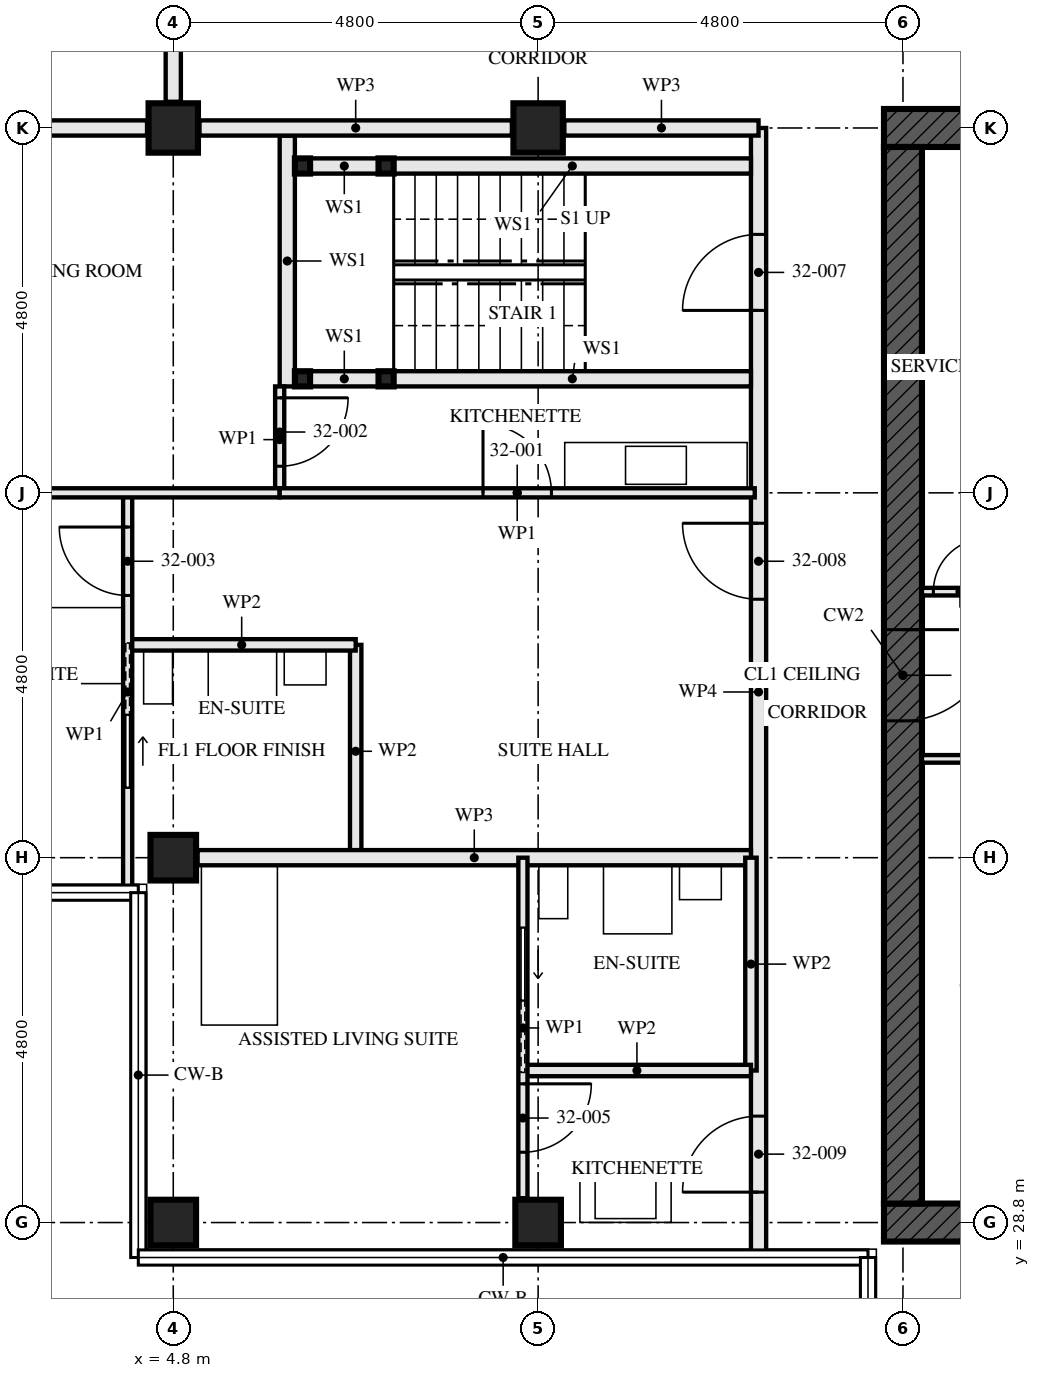
"""IFC4 building model, lengths in metres.
Left out: names, types, materials, properties, quantities, classifications, styles, units other than length and angle.
Written with IfcOpenShell. Run it as: python <this file> out.ifc"""

import sys

from ifc_helpers import new_model, si_unit, direction, frame, frame_2d, origin, origin_2d, place, context, subcontext, project, spatial, rectangle, hollow_rectangle, extrude, element, fill, save


model = new_model("IFC4")
c1 = context("Model", 3, precision=1e-05, world=origin(), true_north=direction((0.0, 1.0)))
c2 = subcontext(c1, "Body", "Model", "MODEL_VIEW")
j1 = project(units=[si_unit("LENGTHUNIT", "METRE"), si_unit("PLANEANGLEUNIT", "RADIAN")], contexts=[c1])
p1 = place(None, origin())
s1 = spatial("IfcSite", under=j1, at=p1, CompositionType="ELEMENT")
p2 = place(p1, origin())
s2 = spatial("IfcBuilding", under=s1, at=p2, CompositionType="ELEMENT")
p3 = place(p2, frame((0.0, 0.0, 119.0)))
s3 = spatial("IfcBuildingStorey", under=s2, at=p3, CompositionType="ELEMENT", Elevation=119.0)
for number, where, z_axis, x_axis in (
    (1, (4.8, 28.8, 0.0), (0.0, 0.0, 1.0), (0.0, 1.0, 0.0)),
    (2, (4.8, 33.6, 0.0), (0.0, 0.0, 1.0), (0.0, 1.0, 0.0)),
):
    element("IfcColumn", number, at=place(p3, frame(where, z_axis=z_axis, x_axis=x_axis)), inside=s3, PredefinedType="COLUMN", context=c2, shape_type="SweptSolid", body=[
        extrude(hollow_rectangle(XDim=0.6, YDim=0.6, WallThickness=0.08, at=origin_2d()), origin(), (0.0, 0.0, 1.0), 3.5),
    ])
p4 = place(p3, frame((4.8, 43.2, 0.0), z_axis=(0.0, 0.0, 1.0), x_axis=(0.0, 1.0, 0.0)))
e3 = element("IfcColumn", 3, at=p4, inside=s3, PredefinedType="COLUMN", context=c2, shape_type="SweptSolid", body=[
    extrude(hollow_rectangle(XDim=0.65, YDim=0.65, WallThickness=0.05, at=origin_2d()), origin(), (0.0, 0.0, 1.0), 3.5),
])
p5 = place(p3, frame((9.6, 28.8, 0.0), z_axis=(0.0, 0.0, 1.0), x_axis=(0.0, 1.0, 0.0)))
e4 = element("IfcColumn", 4, at=p5, inside=s3, PredefinedType="COLUMN", context=c2, shape_type="SweptSolid", body=[
    extrude(hollow_rectangle(XDim=0.6, YDim=0.6, WallThickness=0.08, at=origin_2d()), origin(), (0.0, 0.0, 1.0), 3.5),
])
p6 = place(p3, frame((9.6, 43.2, 0.0), z_axis=(0.0, 0.0, 1.0), x_axis=(0.0, 1.0, 0.0)))
e5 = element("IfcColumn", 5, at=p6, inside=s3, PredefinedType="COLUMN", context=c2, shape_type="SweptSolid", body=[
    extrude(hollow_rectangle(XDim=0.65, YDim=0.65, WallThickness=0.05, at=origin_2d()), origin(), (0.0, 0.0, 1.0), 3.5),
])
p7 = place(p3, frame((14.15, 28.8, -0.17), z_axis=(0.0, 0.0, 1.0), x_axis=(1.0, 0.0, 0.0)))
e6 = element("IfcWall", 6, at=p7, inside=s3, PredefinedType="SHEAR", context=c2, shape_type="SweptSolid", body=[
    extrude(rectangle(XDim=14.9, YDim=0.5, at=frame_2d((7.45, 0.0))), origin(), (0.0, 0.0, 1.0), 3.5),
])
p8 = place(p7, frame((6.85, 0.0, 0.17)))
e7 = element("IfcOpeningElement", 7, at=p8, cuts=e6, PredefinedType="OPENING", context=c2, shape_type="SweptSolid", body=[
    extrude(rectangle(XDim=1.2, YDim=2.1, at=frame_2d((0.6, 1.05))), frame((0.0, 0.26, 0.0), z_axis=(0.0, -1.0, 0.0), x_axis=(1.0, 0.0, 0.0)), (0.0, 0.0, 1.0), 0.521),
])
p9 = place(p3, frame((29.05, 43.2, -0.17), z_axis=(0.0, 0.0, 1.0), x_axis=(-1.0, 0.0, 0.0)))
e8 = element("IfcWall", 8, at=p9, inside=s3, PredefinedType="SHEAR", context=c2, shape_type="SweptSolid", body=[
    extrude(rectangle(XDim=14.9, YDim=0.5, at=frame_2d((7.45, 0.0))), origin(), (0.0, 0.0, 1.0), 3.5),
])
p10 = place(p9, frame((6.85, 0.0, 0.17)))
e9 = element("IfcOpeningElement", 9, at=p10, cuts=e8, PredefinedType="OPENING", context=c2, shape_type="SweptSolid", body=[
    extrude(rectangle(XDim=1.2, YDim=2.1, at=frame_2d((0.6, 1.05))), frame((0.0, 0.26, 0.0), z_axis=(0.0, -1.0, 0.0), x_axis=(1.0, 0.0, 0.0)), (0.0, 0.0, 1.0), 0.521),
])
p11 = place(p3, frame((14.4, 42.95, -0.17), z_axis=(0.0, 0.0, 1.0), x_axis=(0.0, -1.0, 0.0)))
e10 = element("IfcWall", 10, at=p11, inside=s3, PredefinedType="SHEAR", context=c2, shape_type="SweptSolid", body=[
    extrude(rectangle(XDim=13.9, YDim=0.5, at=frame_2d((6.95, 0.0))), origin(), (0.0, 0.0, 1.0), 3.5),
])
p12 = place(p11, frame((6.35, 0.0, 0.17)))
e11 = element("IfcOpeningElement", 11, at=p12, cuts=e10, PredefinedType="OPENING", context=c2, shape_type="SweptSolid", body=[
    extrude(rectangle(XDim=1.2, YDim=2.1, at=frame_2d((0.6, 1.05))), frame((0.0, 0.26, 0.0), z_axis=(0.0, -1.0, 0.0), x_axis=(1.0, 0.0, 0.0)), (0.0, 0.0, 1.0), 0.521),
])
for number, where, z_axis, x_axis in (
    (12, (6.5, 42.7, 0.0), (0.0, 0.0, 1.0), (1.0, 0.0, 0.0)),
    (13, (6.5, 39.9, 0.0), (0.0, 0.0, 1.0), (1.0, 0.0, 0.0)),
    (14, (7.6, 42.7, 0.0), (0.0, 0.0, 1.0), (1.0, 0.0, 0.0)),
    (15, (7.6, 39.9, 0.0), (0.0, 0.0, 1.0), (1.0, 0.0, 0.0)),
):
    element("IfcColumn", number, at=place(p3, frame(where, z_axis=z_axis, x_axis=x_axis)), inside=s3, PredefinedType="COLUMN", context=c2, shape_type="SweptSolid", body=[
        extrude(hollow_rectangle(XDim=0.2, YDim=0.2, WallThickness=0.008, at=origin_2d()), origin(), (0.0, 0.0, 1.0), 3.33),
    ])
p13 = place(p3, frame((6.6, 42.7, 0.0), z_axis=(0.0, 0.0, 1.0), x_axis=(1.0, 0.0, 0.0)))
e16 = element("IfcWall", 16, at=p13, inside=s3, PredefinedType="SOLIDWALL", context=c2, shape_type="SweptSolid", body=[
    extrude(rectangle(XDim=0.9, YDim=0.2, at=frame_2d((0.45, 0.0))), origin(), (0.0, 0.0, 1.0), 2.99),
])
p14 = place(p3, frame((7.7, 42.7, 0.0), z_axis=(0.0, 0.0, 1.0), x_axis=(1.0, 0.0, 0.0)))
e17 = element("IfcWall", 17, at=p14, inside=s3, PredefinedType="SOLIDWALL", context=c2, shape_type="SweptSolid", body=[
    extrude(rectangle(XDim=4.7, YDim=0.2, at=frame_2d((2.35, 0.0))), origin(), (0.0, 0.0, 1.0), 2.99),
])
p15 = place(p3, frame((6.6, 39.9, 0.0), z_axis=(0.0, 0.0, 1.0), x_axis=(1.0, 0.0, 0.0)))
e18 = element("IfcWall", 18, at=p15, inside=s3, PredefinedType="SOLIDWALL", context=c2, shape_type="SweptSolid", body=[
    extrude(rectangle(XDim=0.9, YDim=0.2, at=frame_2d((0.45, 0.0))), origin(), (0.0, 0.0, 1.0), 2.99),
])
p16 = place(p3, frame((7.7, 39.9, 0.0), z_axis=(0.0, 0.0, 1.0), x_axis=(1.0, 0.0, 0.0)))
e19 = element("IfcWall", 19, at=p16, inside=s3, PredefinedType="SOLIDWALL", context=c2, shape_type="SweptSolid", body=[
    extrude(rectangle(XDim=4.7, YDim=0.2, at=frame_2d((2.35, 0.0))), origin(), (0.0, 0.0, 1.0), 2.99),
])
p17 = place(p3, frame((6.3, 43.1, 0.0), z_axis=(0.0, 0.0, 1.0), x_axis=(0.0, -1.0, 0.0)))
e20 = element("IfcWall", 20, at=p17, inside=s3, PredefinedType="SOLIDWALL", context=c2, shape_type="SweptSolid", body=[
    extrude(rectangle(XDim=3.3, YDim=0.2, at=frame_2d((1.65, 0.0))), origin(), (0.0, 0.0, 1.0), 3.33),
])
p18 = place(p3, frame((4.2, 36.4, 0.0), z_axis=(0.0, 0.0, 1.0), x_axis=(1.0, 0.0, 0.0)))
e21 = element("IfcWall", 21, at=p18, inside=s3, PredefinedType="PARTITIONING", context=c2, shape_type="SweptSolid", body=[
    extrude(rectangle(XDim=3.0, YDim=0.15, at=frame_2d((1.5, 0.0))), origin(), (0.0, 0.0, 1.0), 3.33),
])
p19 = place(p3, frame((7.2, 36.4, 0.0), z_axis=(0.0, 0.0, 1.0), x_axis=(0.0, -1.0, 0.0)))
e22 = element("IfcWall", 22, at=p19, inside=s3, PredefinedType="PARTITIONING", context=c2, shape_type="SweptSolid", body=[
    extrude(rectangle(XDim=2.8, YDim=0.15, at=frame_2d((1.4, 0.0))), origin(), (0.0, 0.0, 1.0), 3.33),
])
p20 = place(p3, frame((6.2, 38.4, 0.0), z_axis=(0.0, 0.0, 1.0), x_axis=(1.0, 0.0, 0.0)))
e23 = element("IfcWall", 23, at=p20, inside=s3, PredefinedType="PARTITIONING", context=c2, shape_type="SweptSolid", body=[
    extrude(rectangle(XDim=6.25, YDim=0.12, at=frame_2d((3.125, 0.0))), origin(), (0.0, 0.0, 1.0), 2.55),
])
p21 = place(p20, frame((2.675, 0.0, 0.0)))
e24 = element("IfcOpeningElement", 24, at=p21, cuts=e23, PredefinedType="OPENING", context=c2, shape_type="SweptSolid", body=[
    extrude(rectangle(XDim=0.9, YDim=2.1, at=frame_2d((0.45, 1.05))), frame((0.0, 0.071, 0.0), z_axis=(0.0, -1.0, 0.0), x_axis=(1.0, 0.0, 0.0)), (0.0, 0.0, 1.0), 0.141),
])
p22 = place(p3, frame((6.2, 39.8, 0.0), z_axis=(0.0, 0.0, 1.0), x_axis=(0.0, -1.0, 0.0)))
e25 = element("IfcWall", 25, at=p22, inside=s3, PredefinedType="PARTITIONING", context=c2, shape_type="SweptSolid", body=[
    extrude(rectangle(XDim=1.4, YDim=0.12, at=frame_2d((0.7, 0.0))), origin(), (0.0, 0.0, 1.0), 3.33),
])
p23 = place(p22, frame((0.15, 0.0, 0.0)))
e26 = element("IfcOpeningElement", 26, at=p23, cuts=e25, PredefinedType="OPENING", context=c2, shape_type="SweptSolid", body=[
    extrude(rectangle(XDim=0.9, YDim=2.1, at=frame_2d((0.45, 1.05))), frame((0.0, 0.071, 0.0), z_axis=(0.0, -1.0, 0.0), x_axis=(1.0, 0.0, 0.0)), (0.0, 0.0, 1.0), 0.141),
])
p24 = place(p3, frame((4.2, 38.4, 0.0), z_axis=(0.0, 0.0, 1.0), x_axis=(0.0, -1.0, 0.0)))
e27 = element("IfcWall", 27, at=p24, inside=s3, PredefinedType="PARTITIONING", context=c2, shape_type="SweptSolid", body=[
    extrude(rectangle(XDim=5.24, YDim=0.12, at=frame_2d((2.62, 0.0))), origin(), (0.0, 0.0, 1.0), 2.32),
])
p25 = place(p24, frame((0.45, 0.0, 0.0)))
e28 = element("IfcOpeningElement", 28, at=p25, cuts=e27, PredefinedType="OPENING", context=c2, shape_type="SweptSolid", body=[
    extrude(rectangle(XDim=0.9, YDim=2.1, at=frame_2d((0.45, 1.05))), frame((0.0, 0.071, 0.0), z_axis=(0.0, -1.0, 0.0), x_axis=(1.0, 0.0, 0.0)), (0.0, 0.0, 1.0), 0.141),
])
p26 = place(p24, frame((2.925, 0.0, 0.0)))
e29 = element("IfcOpeningElement", 29, at=p26, cuts=e27, PredefinedType="OPENING", context=c2, shape_type="SweptSolid", body=[
    extrude(rectangle(XDim=0.95, YDim=2.1, at=frame_2d((0.475, 1.05))), frame((0.0, 0.071, 0.0), z_axis=(0.0, -1.0, 0.0), x_axis=(1.0, 0.0, 0.0)), (0.0, 0.0, 1.0), 0.141),
])
p27 = place(p3, frame((0.32, 38.4, 0.0), z_axis=(0.0, 0.0, 1.0), x_axis=(1.0, 0.0, 0.0)))
e30 = element("IfcWall", 30, at=p27, inside=s3, PredefinedType="PARTITIONING", context=c2, shape_type="SweptSolid", body=[
    extrude(rectangle(XDim=5.88, YDim=0.12, at=frame_2d((2.94, 0.0))), origin(), (0.0, 0.0, 1.0), 2.55),
])
p28 = place(p3, frame((5.12, 33.6, 0.0), z_axis=(0.0, 0.0, 1.0), x_axis=(1.0, 0.0, 0.0)))
e31 = element("IfcWall", 31, at=p28, inside=s3, PredefinedType="PARTITIONING", context=c2, shape_type="SweptSolid", body=[
    extrude(rectangle(XDim=7.28, YDim=0.2, at=frame_2d((3.64, 0.0))), origin(), (0.0, 0.0, 1.0), 2.55),
])
p29 = place(p3, frame((9.4, 30.8, 0.0), z_axis=(0.0, 0.0, 1.0), x_axis=(1.0, 0.0, 0.0)))
e32 = element("IfcWall", 32, at=p29, inside=s3, PredefinedType="PARTITIONING", context=c2, shape_type="SweptSolid", body=[
    extrude(rectangle(XDim=3.0, YDim=0.15, at=frame_2d((1.5, 0.0))), origin(), (0.0, 0.0, 1.0), 3.33),
])
p30 = place(p3, frame((12.4, 33.6, 0.0), z_axis=(0.0, 0.0, 1.0), x_axis=(0.0, -1.0, 0.0)))
e33 = element("IfcWall", 33, at=p30, inside=s3, PredefinedType="PARTITIONING", context=c2, shape_type="SweptSolid", body=[
    extrude(rectangle(XDim=2.8, YDim=0.15, at=frame_2d((1.4, 0.0))), origin(), (0.0, 0.0, 1.0), 3.33),
])
p31 = place(p3, frame((9.4, 33.6, 0.0), z_axis=(0.0, 0.0, 1.0), x_axis=(0.0, -1.0, 0.0)))
e34 = element("IfcWall", 34, at=p31, inside=s3, PredefinedType="PARTITIONING", context=c2, shape_type="SweptSolid", body=[
    extrude(rectangle(XDim=4.48, YDim=0.12, at=frame_2d((2.24, 0.0))), origin(), (0.0, 0.0, 1.0), 3.33),
])
p32 = place(p31, frame((2.975, 0.0, 0.0)))
e35 = element("IfcOpeningElement", 35, at=p32, cuts=e34, PredefinedType="OPENING", context=c2, shape_type="SweptSolid", body=[
    extrude(rectangle(XDim=0.9, YDim=2.1, at=frame_2d((0.45, 1.05))), frame((0.0, 0.071, 0.0), z_axis=(0.0, -1.0, 0.0), x_axis=(1.0, 0.0, 0.0)), (0.0, 0.0, 1.0), 0.141),
])
p33 = place(p31, frame((0.925, 0.0, 0.0)))
e36 = element("IfcOpeningElement", 36, at=p33, cuts=e34, PredefinedType="OPENING", context=c2, shape_type="SweptSolid", body=[
    extrude(rectangle(XDim=0.95, YDim=2.1, at=frame_2d((0.475, 1.05))), frame((0.0, 0.071, 0.0), z_axis=(0.0, -1.0, 0.0), x_axis=(1.0, 0.0, 0.0)), (0.0, 0.0, 1.0), 0.141),
])
p34 = place(p3, frame((12.5, 43.2, 0.0), z_axis=(0.0, 0.0, 1.0), x_axis=(0.0, -1.0, 0.0)))
e37 = element("IfcWall", 37, at=p34, inside=s3, PredefinedType="PARTITIONING", context=c2, shape_type="SweptSolid", body=[
    extrude(rectangle(XDim=14.84, YDim=0.2, at=frame_2d((7.42, 0.0))), origin(), (0.0, 0.0, 1.0), 2.32),
])
p35 = place(p34, frame((1.4, 0.0, 0.0)))
e38 = element("IfcOpeningElement", 38, at=p35, cuts=e37, PredefinedType="OPENING", context=c2, shape_type="SweptSolid", body=[
    extrude(rectangle(XDim=1.0, YDim=2.1, at=frame_2d((0.5, 1.05))), frame((0.0, 0.111, 0.0), z_axis=(0.0, -1.0, 0.0), x_axis=(1.0, 0.0, 0.0)), (0.0, 0.0, 1.0), 0.221),
])
p36 = place(p34, frame((5.2, 0.0, 0.0)))
e39 = element("IfcOpeningElement", 39, at=p36, cuts=e37, PredefinedType="OPENING", context=c2, shape_type="SweptSolid", body=[
    extrude(rectangle(XDim=1.0, YDim=2.1, at=frame_2d((0.5, 1.05))), frame((0.0, 0.111, 0.0), z_axis=(0.0, -1.0, 0.0), x_axis=(1.0, 0.0, 0.0)), (0.0, 0.0, 1.0), 0.221),
])
p37 = place(p34, frame((13.0, 0.0, 0.0)))
e40 = element("IfcOpeningElement", 40, at=p37, cuts=e37, PredefinedType="OPENING", context=c2, shape_type="SweptSolid", body=[
    extrude(rectangle(XDim=1.0, YDim=2.1, at=frame_2d((0.5, 1.05))), frame((0.0, 0.111, 0.0), z_axis=(0.0, -1.0, 0.0), x_axis=(1.0, 0.0, 0.0)), (0.0, 0.0, 1.0), 0.221),
])
p38 = place(p3, frame((4.8, 45.2, 0.0), z_axis=(0.0, 0.0, 1.0), x_axis=(0.0, -1.0, 0.0)))
e41 = element("IfcWall", 41, at=p38, inside=s3, PredefinedType="PARTITIONING", context=c2, shape_type="SweptSolid", body=[
    extrude(rectangle(XDim=1.655, YDim=0.2, at=frame_2d((0.828, 0.0))), origin(), (0.0, 0.0, 1.0), 3.33),
])
p39 = place(p3, frame((14.65, 34.9, 0.0), z_axis=(0.0, 0.0, 1.0), x_axis=(1.0, 0.0, 0.0)))
e42 = element("IfcWall", 42, at=p39, inside=s3, PredefinedType="SOLIDWALL", context=c2, shape_type="SweptSolid", body=[
    extrude(rectangle(XDim=5.9, YDim=0.1, at=frame_2d((2.95, 0.0))), origin(), (0.0, 0.0, 1.0), 3.33),
])
p40 = place(p39, frame((1.6, 0.0, 0.0)))
e43 = element("IfcOpeningElement", 43, at=p40, cuts=e42, PredefinedType="OPENING", context=c2, shape_type="SweptSolid", body=[
    extrude(rectangle(XDim=0.7, YDim=2.1, at=frame_2d((0.35, 1.05))), frame((0.0, 0.061, 0.0), z_axis=(0.0, -1.0, 0.0), x_axis=(1.0, 0.0, 0.0)), (0.0, 0.0, 1.0), 0.121),
])
p41 = place(p3, frame((14.65, 37.1, 0.0), z_axis=(0.0, 0.0, 1.0), x_axis=(1.0, 0.0, 0.0)))
e44 = element("IfcWall", 44, at=p41, inside=s3, PredefinedType="SOLIDWALL", context=c2, shape_type="SweptSolid", body=[
    extrude(rectangle(XDim=5.9, YDim=0.1, at=frame_2d((2.95, 0.0))), origin(), (0.0, 0.0, 1.0), 3.33),
])
p42 = place(p41, frame((0.15, 0.0, 0.0)))
e45 = element("IfcOpeningElement", 45, at=p42, cuts=e44, PredefinedType="OPENING", context=c2, shape_type="SweptSolid", body=[
    extrude(rectangle(XDim=0.7, YDim=2.1, at=frame_2d((0.35, 1.05))), frame((0.0, 0.061, 0.0), z_axis=(0.0, -1.0, 0.0), x_axis=(1.0, 0.0, 0.0)), (0.0, 0.0, 1.0), 0.121),
])
p43 = place(p41, frame((1.5, 0.0, 0.0)))
e46 = element("IfcOpeningElement", 46, at=p43, cuts=e44, PredefinedType="OPENING", context=c2, shape_type="SweptSolid", body=[
    extrude(rectangle(XDim=0.9, YDim=2.1, at=frame_2d((0.45, 1.05))), frame((0.0, 0.061, 0.0), z_axis=(0.0, -1.0, 0.0), x_axis=(1.0, 0.0, 0.0)), (0.0, 0.0, 1.0), 0.121),
])
p44 = place(p3, frame((12.5, 43.2, 0.0), z_axis=(0.0, 0.0, 1.0), x_axis=(-1.0, 0.0, 0.0)))
e47 = element("IfcWall", 47, at=p44, inside=s3, PredefinedType="PARTITIONING", context=c2, shape_type="SweptSolid", body=[
    extrude(rectangle(XDim=2.555, YDim=0.2, at=frame_2d((1.277, 0.0))), origin(), (0.0, 0.0, 1.0), 2.32),
])
p45 = place(p3, frame((9.255, 43.2, 0.0), z_axis=(0.0, 0.0, 1.0), x_axis=(-1.0, 0.0, 0.0)))
e48 = element("IfcWall", 48, at=p45, inside=s3, PredefinedType="PARTITIONING", context=c2, shape_type="SweptSolid", body=[
    extrude(rectangle(XDim=4.11, YDim=0.2, at=frame_2d((2.055, 0.0))), origin(), (0.0, 0.0, 1.0), 2.32),
])
p46 = place(p3, frame((4.455, 43.2, 0.0), z_axis=(0.0, 0.0, 1.0), x_axis=(-1.0, 0.0, 0.0)))
e49 = element("IfcWall", 49, at=p46, inside=s3, PredefinedType="PARTITIONING", context=c2, shape_type="SweptSolid", body=[
    extrude(rectangle(XDim=4.135, YDim=0.2, at=frame_2d((2.067, 0.0))), origin(), (0.0, 0.0, 1.0), 2.32),
])
p47 = place(p21, origin())
e50 = element("IfcDoor", 50, at=p47, inside=s3, OperationType="SINGLE_SWING_RIGHT", PredefinedType="DOOR", context=c2, shape_type="SweptSolid", body=[
    extrude(rectangle(XDim=0.9, YDim=2.1, at=frame_2d((0.45, 1.05))), frame((0.0, 0.022, 0.0), z_axis=(0.0, -1.0, 0.0), x_axis=(1.0, 0.0, 0.0)), (0.0, 0.0, 1.0), 0.044),
])
fill(e24, e50)
p48 = place(p23, origin())
e51 = element("IfcDoor", 51, at=p48, inside=s3, OperationType="SINGLE_SWING_RIGHT", PredefinedType="DOOR", context=c2, shape_type="SweptSolid", body=[
    extrude(rectangle(XDim=0.9, YDim=2.1, at=frame_2d((0.45, 1.05))), frame((0.0, 0.022, 0.0), z_axis=(0.0, -1.0, 0.0), x_axis=(1.0, 0.0, 0.0)), (0.0, 0.0, 1.0), 0.044),
])
fill(e26, e51)
p49 = place(p25, frame((0.9, 0.0, 0.0), z_axis=(0.0, 0.0, 1.0), x_axis=(-1.0, 0.0, 0.0)))
e52 = element("IfcDoor", 52, at=p49, inside=s3, OperationType="SINGLE_SWING_LEFT", PredefinedType="DOOR", context=c2, shape_type="SweptSolid", body=[
    extrude(rectangle(XDim=0.9, YDim=2.1, at=frame_2d((0.45, 1.05))), frame((0.0, 0.022, 0.0), z_axis=(0.0, -1.0, 0.0), x_axis=(1.0, 0.0, 0.0)), (0.0, 0.0, 1.0), 0.044),
])
fill(e28, e52)
p50 = place(p26, origin())
e53 = element("IfcDoor", 53, at=p50, inside=s3, OperationType="SLIDING_TO_RIGHT", PredefinedType="DOOR", context=c2, shape_type="SweptSolid", body=[
    extrude(rectangle(XDim=0.95, YDim=2.1, at=frame_2d((0.475, 1.05))), frame((0.0, 0.022, 0.0), z_axis=(0.0, -1.0, 0.0), x_axis=(1.0, 0.0, 0.0)), (0.0, 0.0, 1.0), 0.044),
])
fill(e29, e53)
p51 = place(p32, origin())
e54 = element("IfcDoor", 54, at=p51, inside=s3, OperationType="SINGLE_SWING_RIGHT", PredefinedType="DOOR", context=c2, shape_type="SweptSolid", body=[
    extrude(rectangle(XDim=0.9, YDim=2.1, at=frame_2d((0.45, 1.05))), frame((0.0, 0.022, 0.0), z_axis=(0.0, -1.0, 0.0), x_axis=(1.0, 0.0, 0.0)), (0.0, 0.0, 1.0), 0.044),
])
fill(e35, e54)
p52 = place(p33, origin())
e55 = element("IfcDoor", 55, at=p52, inside=s3, OperationType="SLIDING_TO_LEFT", PredefinedType="DOOR", context=c2, shape_type="SweptSolid", body=[
    extrude(rectangle(XDim=0.95, YDim=2.1, at=frame_2d((0.475, 1.05))), frame((0.0, 0.022, 0.0), z_axis=(0.0, -1.0, 0.0), x_axis=(1.0, 0.0, 0.0)), (0.0, 0.0, 1.0), 0.044),
])
fill(e36, e55)
p53 = place(p35, frame((1.0, 0.0, 0.0), z_axis=(0.0, 0.0, 1.0), x_axis=(-1.0, 0.0, 0.0)))
e56 = element("IfcDoor", 56, at=p53, inside=s3, OperationType="SINGLE_SWING_RIGHT", PredefinedType="DOOR", context=c2, shape_type="SweptSolid", body=[
    extrude(rectangle(XDim=1.0, YDim=2.1, at=frame_2d((0.5, 1.05))), frame((0.0, 0.032, 0.0), z_axis=(0.0, -1.0, 0.0), x_axis=(1.0, 0.0, 0.0)), (0.0, 0.0, 1.0), 0.064),
])
fill(e38, e56)
p54 = place(p36, frame((1.0, 0.0, 0.0), z_axis=(0.0, 0.0, 1.0), x_axis=(-1.0, 0.0, 0.0)))
e57 = element("IfcDoor", 57, at=p54, inside=s3, OperationType="SINGLE_SWING_LEFT", PredefinedType="DOOR", context=c2, shape_type="SweptSolid", body=[
    extrude(rectangle(XDim=1.0, YDim=2.1, at=frame_2d((0.5, 1.05))), frame((0.0, 0.027, 0.0), z_axis=(0.0, -1.0, 0.0), x_axis=(1.0, 0.0, 0.0)), (0.0, 0.0, 1.0), 0.054),
])
fill(e39, e57)
p55 = place(p37, frame((1.0, 0.0, 0.0), z_axis=(0.0, 0.0, 1.0), x_axis=(-1.0, 0.0, 0.0)))
e58 = element("IfcDoor", 58, at=p55, inside=s3, OperationType="SINGLE_SWING_RIGHT", PredefinedType="DOOR", context=c2, shape_type="SweptSolid", body=[
    extrude(rectangle(XDim=1.0, YDim=2.1, at=frame_2d((0.5, 1.05))), frame((0.0, 0.027, 0.0), z_axis=(0.0, -1.0, 0.0), x_axis=(1.0, 0.0, 0.0)), (0.0, 0.0, 1.0), 0.054),
])
fill(e40, e58)
p56 = place(p42, origin())
e59 = element("IfcDoor", 59, at=p56, inside=s3, OperationType="SINGLE_SWING_LEFT", PredefinedType="DOOR", context=c2, shape_type="SweptSolid", body=[
    extrude(rectangle(XDim=0.7, YDim=2.1, at=frame_2d((0.35, 1.05))), frame((0.0, 0.027, 0.0), z_axis=(0.0, -1.0, 0.0), x_axis=(1.0, 0.0, 0.0)), (0.0, 0.0, 1.0), 0.054),
])
fill(e45, e59)
p57 = place(p12, origin())
e60 = element("IfcDoor", 60, at=p57, inside=s3, OperationType="SINGLE_SWING_LEFT", PredefinedType="DOOR", context=c2, shape_type="SweptSolid", body=[
    extrude(rectangle(XDim=1.2, YDim=2.1, at=frame_2d((0.6, 1.05))), frame((0.0, 0.027, 0.0), z_axis=(0.0, -1.0, 0.0), x_axis=(1.0, 0.0, 0.0)), (0.0, 0.0, 1.0), 0.054),
])
fill(e11, e60)
save(model, sys.argv[1])
